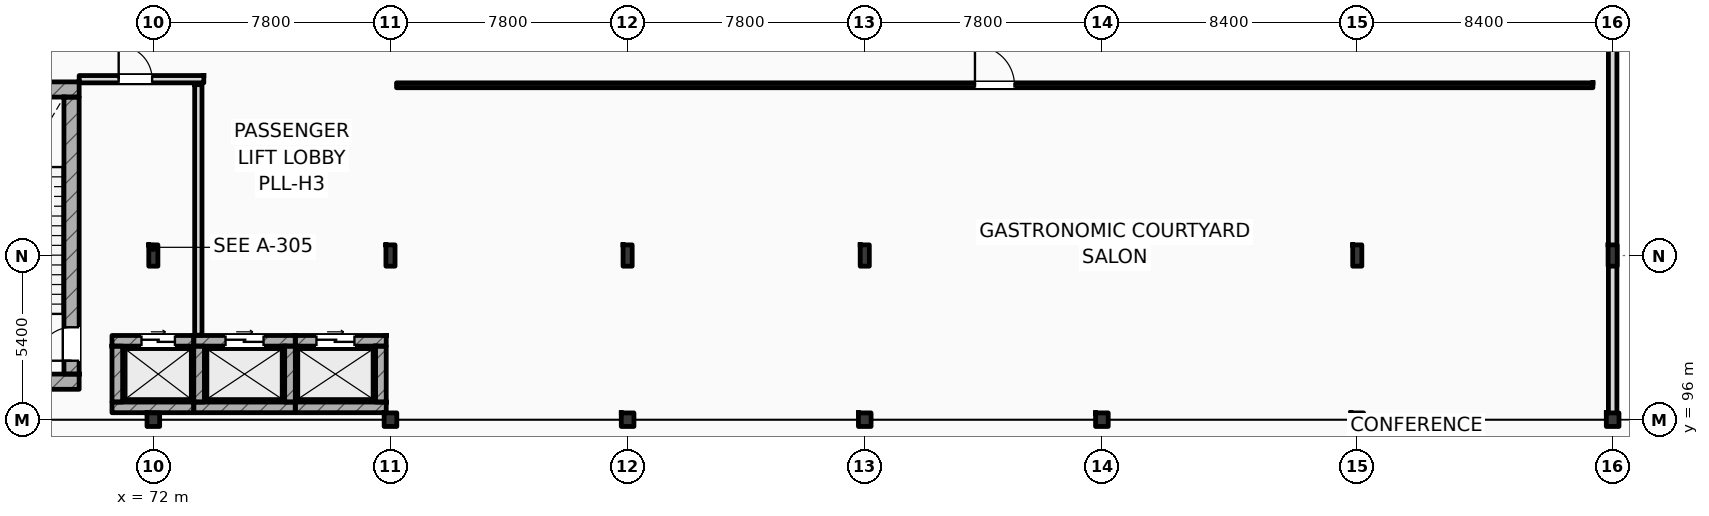
"""IFC4 building model, lengths in metres.
Left out: names, types, materials, properties, quantities, classifications, styles, units other than length and angle.
Written with IfcOpenShell. Run it as: python <this file> out.ifc"""

import sys

from ifc_helpers import new_model, si_unit, direction, frame, frame_2d, origin, origin_2d, place, context, subcontext, project, spatial, rectangle, i_section, extrude, element, fill, save


model = new_model("IFC4")
c1 = context("Model", 3, precision=1e-05, world=origin(), true_north=direction((0.0, 1.0)))
c2 = subcontext(c1, "Body", "Model", "MODEL_VIEW")
j1 = project(units=[si_unit("LENGTHUNIT", "METRE"), si_unit("PLANEANGLEUNIT", "RADIAN")], contexts=[c1])
p1 = place(None, origin())
s1 = spatial("IfcSite", under=j1, at=p1, CompositionType="ELEMENT")
p2 = place(p1, origin())
s2 = spatial("IfcBuilding", under=s1, at=p2, CompositionType="ELEMENT")
p3 = place(p2, frame((0.0, 0.0, 6.0)))
s3 = spatial("IfcBuildingStorey", under=s2, at=p3, CompositionType="ELEMENT", Elevation=6.0)
p4 = place(p3, frame((72.0, 96.0, 0.0), z_axis=(0.0, 0.0, 1.0), x_axis=(1.0, 0.0, 0.0)))
e1 = element("IfcColumn", 1, at=p4, inside=s3, PredefinedType="COLUMN", context=c2, shape_type="SweptSolid", body=[
    extrude(i_section(OverallWidth=0.416, OverallDepth=0.446, WebThickness=0.036, FlangeThickness=0.048, FilletRadius=0.015, at=origin_2d()), origin(), (0.0, 0.0, 1.0), 5.4),
])
p5 = place(p3, frame((72.0, 101.4, 0.0), z_axis=(0.0, 0.0, 1.0), x_axis=(1.0, 0.0, 0.0)))
e2 = element("IfcColumn", 2, at=p5, inside=s3, PredefinedType="COLUMN", context=c2, shape_type="SweptSolid", body=[
    extrude(i_section(OverallWidth=0.3, OverallDepth=0.7, WebThickness=0.017, FlangeThickness=0.032, FilletRadius=0.027, at=origin_2d()), origin(), (0.0, 0.0, 1.0), 5.4),
])
p6 = place(p3, frame((79.8, 96.0, 0.0), z_axis=(0.0, 0.0, 1.0), x_axis=(1.0, 0.0, 0.0)))
e3 = element("IfcColumn", 3, at=p6, inside=s3, PredefinedType="COLUMN", context=c2, shape_type="SweptSolid", body=[
    extrude(i_section(OverallWidth=0.416, OverallDepth=0.446, WebThickness=0.036, FlangeThickness=0.048, FilletRadius=0.015, at=origin_2d()), origin(), (0.0, 0.0, 1.0), 5.4),
])
p7 = place(p3, frame((79.8, 101.4, 0.0), z_axis=(0.0, 0.0, 1.0), x_axis=(1.0, 0.0, 0.0)))
e4 = element("IfcColumn", 4, at=p7, inside=s3, PredefinedType="COLUMN", context=c2, shape_type="SweptSolid", body=[
    extrude(i_section(OverallWidth=0.3, OverallDepth=0.7, WebThickness=0.017, FlangeThickness=0.032, FilletRadius=0.027, at=origin_2d()), origin(), (0.0, 0.0, 1.0), 5.4),
])
p8 = place(p3, frame((87.6, 96.0, 0.0), z_axis=(0.0, 0.0, 1.0), x_axis=(1.0, 0.0, 0.0)))
e5 = element("IfcColumn", 5, at=p8, inside=s3, PredefinedType="COLUMN", context=c2, shape_type="SweptSolid", body=[
    extrude(i_section(OverallWidth=0.416, OverallDepth=0.446, WebThickness=0.036, FlangeThickness=0.048, FilletRadius=0.015, at=origin_2d()), origin(), (0.0, 0.0, 1.0), 5.4),
])
p9 = place(p3, frame((87.6, 101.4, 0.0), z_axis=(0.0, 0.0, 1.0), x_axis=(1.0, 0.0, 0.0)))
e6 = element("IfcColumn", 6, at=p9, inside=s3, PredefinedType="COLUMN", context=c2, shape_type="SweptSolid", body=[
    extrude(i_section(OverallWidth=0.3, OverallDepth=0.7, WebThickness=0.017, FlangeThickness=0.032, FilletRadius=0.027, at=origin_2d()), origin(), (0.0, 0.0, 1.0), 5.4),
])
p10 = place(p3, frame((95.4, 96.0, 0.0), z_axis=(0.0, 0.0, 1.0), x_axis=(1.0, 0.0, 0.0)))
e7 = element("IfcColumn", 7, at=p10, inside=s3, PredefinedType="COLUMN", context=c2, shape_type="SweptSolid", body=[
    extrude(i_section(OverallWidth=0.416, OverallDepth=0.446, WebThickness=0.036, FlangeThickness=0.048, FilletRadius=0.015, at=origin_2d()), origin(), (0.0, 0.0, 1.0), 5.4),
])
p11 = place(p3, frame((95.4, 101.4, 0.0), z_axis=(0.0, 0.0, 1.0), x_axis=(1.0, 0.0, 0.0)))
e8 = element("IfcColumn", 8, at=p11, inside=s3, PredefinedType="COLUMN", context=c2, shape_type="SweptSolid", body=[
    extrude(i_section(OverallWidth=0.3, OverallDepth=0.7, WebThickness=0.017, FlangeThickness=0.032, FilletRadius=0.027, at=origin_2d()), origin(), (0.0, 0.0, 1.0), 5.4),
])
p12 = place(p3, frame((103.2, 96.0, 0.0), z_axis=(0.0, 0.0, 1.0), x_axis=(1.0, 0.0, 0.0)))
e9 = element("IfcColumn", 9, at=p12, inside=s3, PredefinedType="COLUMN", context=c2, shape_type="SweptSolid", body=[
    extrude(i_section(OverallWidth=0.416, OverallDepth=0.446, WebThickness=0.036, FlangeThickness=0.048, FilletRadius=0.015, at=origin_2d()), origin(), (0.0, 0.0, 1.0), 5.4),
])
p13 = place(p3, frame((103.2, 101.4, 0.0), z_axis=(0.0, 0.0, 1.0), x_axis=(1.0, 0.0, 0.0)))
e10 = element("IfcColumn", 10, at=p13, inside=s3, PredefinedType="COLUMN", context=c2, shape_type="SweptSolid", body=[
    extrude(i_section(OverallWidth=0.3, OverallDepth=0.7, WebThickness=0.017, FlangeThickness=0.032, FilletRadius=0.027, at=origin_2d()), origin(), (0.0, 0.0, 1.0), 5.4),
])
p14 = place(p3, frame((111.6, 96.0, 0.0), z_axis=(0.0, 0.0, 1.0), x_axis=(1.0, 0.0, 0.0)))
e11 = element("IfcColumn", 11, at=p14, inside=s3, PredefinedType="COLUMN", context=c2, shape_type="SweptSolid", body=[
    extrude(i_section(OverallWidth=0.416, OverallDepth=0.446, WebThickness=0.036, FlangeThickness=0.048, FilletRadius=0.015, at=origin_2d()), origin(), (0.0, 0.0, 1.0), 5.4),
])
p15 = place(p3, frame((111.6, 101.4, 0.0), z_axis=(0.0, 0.0, 1.0), x_axis=(1.0, 0.0, 0.0)))
e12 = element("IfcColumn", 12, at=p15, inside=s3, PredefinedType="COLUMN", context=c2, shape_type="SweptSolid", body=[
    extrude(i_section(OverallWidth=0.3, OverallDepth=0.7, WebThickness=0.017, FlangeThickness=0.032, FilletRadius=0.027, at=origin_2d()), origin(), (0.0, 0.0, 1.0), 5.4),
])
p16 = place(p3, frame((120.0, 96.0, 0.0), z_axis=(0.0, 0.0, 1.0), x_axis=(1.0, 0.0, 0.0)))
e13 = element("IfcColumn", 13, at=p16, inside=s3, PredefinedType="COLUMN", context=c2, shape_type="SweptSolid", body=[
    extrude(i_section(OverallWidth=0.416, OverallDepth=0.446, WebThickness=0.036, FlangeThickness=0.048, FilletRadius=0.015, at=origin_2d()), origin(), (0.0, 0.0, 1.0), 5.4),
])
p17 = place(p3, frame((120.0, 101.4, 0.0), z_axis=(0.0, 0.0, 1.0), x_axis=(1.0, 0.0, 0.0)))
e14 = element("IfcColumn", 14, at=p17, inside=s3, PredefinedType="COLUMN", context=c2, shape_type="SweptSolid", body=[
    extrude(i_section(OverallWidth=0.3, OverallDepth=0.7, WebThickness=0.017, FlangeThickness=0.032, FilletRadius=0.027, at=origin_2d()), origin(), (0.0, 0.0, 1.0), 5.4),
])
for number, where, z_axis, x_axis in (
    (15, (64.4, 106.862, 0.0), (0.0, 0.0, 1.0), (1.0, 0.0, 0.0)),
    (16, (64.4, 97.25, 0.0), (0.0, 0.0, 1.0), (1.0, 0.0, 0.0)),
):
    element("IfcWall", number, at=place(p3, frame(where, z_axis=z_axis, x_axis=x_axis)), inside=s3, PredefinedType="SHEAR", context=c2, shape_type="SweptSolid", body=[
        extrude(rectangle(XDim=5.16, YDim=0.5, at=frame_2d((2.58, 0.0))), origin(), (0.0, 0.0, 1.0), 5.4),
    ])
p18 = place(p3, frame((69.31, 97.5, 0.0), z_axis=(0.0, 0.0, 1.0), x_axis=(0.0, 1.0, 0.0)))
e17 = element("IfcWall", 17, at=p18, inside=s3, PredefinedType="SHEAR", context=c2, shape_type="SweptSolid", body=[
    extrude(rectangle(XDim=9.112, YDim=0.5, at=frame_2d((4.556, 0.0))), origin(), (0.0, 0.0, 1.0), 5.4),
])
p19 = place(p18, frame((0.44, 0.0, 0.0)))
e18 = element("IfcOpeningElement", 18, at=p19, cuts=e17, PredefinedType="OPENING", context=c2, shape_type="SweptSolid", body=[
    extrude(rectangle(XDim=1.1, YDim=2.2, at=frame_2d((0.55, 1.1))), frame((0.0, 0.26, 0.0), z_axis=(0.0, -1.0, 0.0), x_axis=(1.0, 0.0, 0.0)), (0.0, 0.0, 1.0), 0.52),
])
p20 = place(p3, frame((120.0, 96.0, 0.0), z_axis=(0.0, 0.0, 1.0), x_axis=(0.0, 1.0, 0.0)))
e19 = element("IfcWall", 19, at=p20, inside=s3, PredefinedType="STANDARD", context=c2, shape_type="SweptSolid", body=[
    extrude(rectangle(XDim=22.0, YDim=0.28, at=frame_2d((11.0, 0.0))), origin(), (0.0, 0.0, 1.0), 4.59),
])
p21 = place(p3, frame((70.64, 98.595, 0.0), z_axis=(0.0, 0.0, 1.0), x_axis=(1.0, 0.0, 0.0)))
e20 = element("IfcWall", 20, at=p21, inside=s3, PredefinedType="SHEAR", context=c2, shape_type="SweptSolid", body=[
    extrude(rectangle(XDim=2.69, YDim=0.35, at=frame_2d((1.345, 0.0))), origin(), (0.0, 0.0, 1.0), 5.05),
])
p22 = place(p21, frame((0.97, 0.0, 0.0)))
e21 = element("IfcOpeningElement", 21, at=p22, cuts=e20, PredefinedType="OPENING", context=c2, shape_type="SweptSolid", body=[
    extrude(rectangle(XDim=1.1, YDim=2.2, at=frame_2d((0.55, 1.1))), frame((0.0, 0.185, 0.0), z_axis=(0.0, -1.0, 0.0), x_axis=(1.0, 0.0, 0.0)), (0.0, 0.0, 1.0), 0.37),
])
p23 = place(p3, frame((70.64, 96.405, 0.0), z_axis=(0.0, 0.0, 1.0), x_axis=(1.0, 0.0, 0.0)))
e22 = element("IfcWall", 22, at=p23, inside=s3, PredefinedType="SHEAR", context=c2, shape_type="SweptSolid", body=[
    extrude(rectangle(XDim=2.69, YDim=0.35, at=frame_2d((1.345, 0.0))), origin(), (0.0, 0.0, 1.0), 5.05),
])
p24 = place(p3, frame((70.815, 96.58, 0.0), z_axis=(0.0, 0.0, 1.0), x_axis=(0.0, 1.0, 0.0)))
e23 = element("IfcWall", 23, at=p24, inside=s3, PredefinedType="SHEAR", context=c2, shape_type="SweptSolid", body=[
    extrude(rectangle(XDim=1.84, YDim=0.35, at=frame_2d((0.92, 0.0))), origin(), (0.0, 0.0, 1.0), 5.05),
])
p25 = place(p3, frame((73.33, 98.595, 0.0), z_axis=(0.0, 0.0, 1.0), x_axis=(1.0, 0.0, 0.0)))
e24 = element("IfcWall", 24, at=p25, inside=s3, PredefinedType="SHEAR", context=c2, shape_type="SweptSolid", body=[
    extrude(rectangle(XDim=3.34, YDim=0.35, at=frame_2d((1.67, 0.0))), origin(), (0.0, 0.0, 1.0), 5.05),
])
p26 = place(p25, frame((1.045, 0.0, 0.0)))
e25 = element("IfcOpeningElement", 25, at=p26, cuts=e24, PredefinedType="OPENING", context=c2, shape_type="SweptSolid", body=[
    extrude(rectangle(XDim=1.25, YDim=2.25, at=frame_2d((0.625, 1.125))), frame((0.0, 0.185, 0.0), z_axis=(0.0, -1.0, 0.0), x_axis=(1.0, 0.0, 0.0)), (0.0, 0.0, 1.0), 0.37),
])
p27 = place(p3, frame((73.33, 96.405, 0.0), z_axis=(0.0, 0.0, 1.0), x_axis=(1.0, 0.0, 0.0)))
e26 = element("IfcWall", 26, at=p27, inside=s3, PredefinedType="SHEAR", context=c2, shape_type="SweptSolid", body=[
    extrude(rectangle(XDim=3.34, YDim=0.35, at=frame_2d((1.67, 0.0))), origin(), (0.0, 0.0, 1.0), 5.05),
])
for number, where, z_axis, x_axis in (
    (27, (73.505, 96.58, 0.0), (0.0, 0.0, 1.0), (0.0, 1.0, 0.0)),
    (28, (76.495, 96.58, 0.0), (0.0, 0.0, 1.0), (0.0, 1.0, 0.0)),
):
    element("IfcWall", number, at=place(p3, frame(where, z_axis=z_axis, x_axis=x_axis)), inside=s3, PredefinedType="SHEAR", context=c2, shape_type="SweptSolid", body=[
        extrude(rectangle(XDim=1.84, YDim=0.35, at=frame_2d((0.92, 0.0))), origin(), (0.0, 0.0, 1.0), 5.05),
    ])
p28 = place(p3, frame((76.67, 98.595, 0.0), z_axis=(0.0, 0.0, 1.0), x_axis=(1.0, 0.0, 0.0)))
e29 = element("IfcWall", 29, at=p28, inside=s3, PredefinedType="SHEAR", context=c2, shape_type="SweptSolid", body=[
    extrude(rectangle(XDim=2.99, YDim=0.35, at=frame_2d((1.495, 0.0))), origin(), (0.0, 0.0, 1.0), 5.05),
])
p29 = place(p28, frame((0.695, 0.0, 0.0)))
e30 = element("IfcOpeningElement", 30, at=p29, cuts=e29, PredefinedType="OPENING", context=c2, shape_type="SweptSolid", body=[
    extrude(rectangle(XDim=1.25, YDim=2.25, at=frame_2d((0.625, 1.125))), frame((0.0, 0.185, 0.0), z_axis=(0.0, -1.0, 0.0), x_axis=(1.0, 0.0, 0.0)), (0.0, 0.0, 1.0), 0.37),
])
p30 = place(p3, frame((76.67, 96.405, 0.0), z_axis=(0.0, 0.0, 1.0), x_axis=(1.0, 0.0, 0.0)))
e31 = element("IfcWall", 31, at=p30, inside=s3, PredefinedType="SHEAR", context=c2, shape_type="SweptSolid", body=[
    extrude(rectangle(XDim=2.99, YDim=0.35, at=frame_2d((1.495, 0.0))), origin(), (0.0, 0.0, 1.0), 5.05),
])
p31 = place(p3, frame((79.485, 96.58, 0.0), z_axis=(0.0, 0.0, 1.0), x_axis=(0.0, 1.0, 0.0)))
e32 = element("IfcWall", 32, at=p31, inside=s3, PredefinedType="SHEAR", context=c2, shape_type="SweptSolid", body=[
    extrude(rectangle(XDim=1.84, YDim=0.35, at=frame_2d((0.92, 0.0))), origin(), (0.0, 0.0, 1.0), 4.59),
])
p32 = place(p3, frame((73.48, 98.78, 0.0), z_axis=(0.0, 0.0, 1.0), x_axis=(0.0, 1.0, 0.0)))
e33 = element("IfcWall", 33, at=p32, inside=s3, PredefinedType="STANDARD", context=c2, shape_type="SweptSolid", body=[
    extrude(rectangle(XDim=8.24, YDim=0.24, at=frame_2d((4.12, 0.0))), origin(), (0.0, 0.0, 1.0), 5.05),
])
p33 = place(p3, frame((69.56, 107.2, 0.0), z_axis=(0.0, 0.0, 1.0), x_axis=(1.0, 0.0, 0.0)))
e34 = element("IfcWall", 34, at=p33, inside=s3, PredefinedType="STANDARD", context=c2, shape_type="SweptSolid", body=[
    extrude(rectangle(XDim=4.1, YDim=0.24, at=frame_2d((2.05, 0.0))), origin(), (0.0, 0.0, 1.0), 5.05),
])
p34 = place(p33, frame((1.3, 0.0, 0.0)))
e35 = element("IfcOpeningElement", 35, at=p34, cuts=e34, PredefinedType="OPENING", context=c2, shape_type="SweptSolid", body=[
    extrude(rectangle(XDim=1.1, YDim=2.2, at=frame_2d((0.55, 1.1))), frame((0.0, 0.13, 0.0), z_axis=(0.0, -1.0, 0.0), x_axis=(1.0, 0.0, 0.0)), (0.0, 0.0, 1.0), 0.26),
])
p35 = place(p3, frame((80.0, 107.0, 0.0), z_axis=(0.0, 0.0, 1.0), x_axis=(1.0, 0.0, 0.0)))
e36 = element("IfcWall", 36, at=p35, inside=s3, PredefinedType="PARTITIONING", context=c2, shape_type="SweptSolid", body=[
    extrude(rectangle(XDim=39.35, YDim=0.16, at=frame_2d((19.675, 0.0))), origin(), (0.0, 0.0, 1.0), 5.05),
])
p36 = place(p35, frame((19.025, 0.0, 0.0)))
e37 = element("IfcOpeningElement", 37, at=p36, cuts=e36, PredefinedType="OPENING", context=c2, shape_type="SweptSolid", body=[
    extrude(rectangle(XDim=1.3, YDim=2.2, at=frame_2d((0.65, 1.1))), frame((0.0, 0.09, 0.0), z_axis=(0.0, -1.0, 0.0), x_axis=(1.0, 0.0, 0.0)), (0.0, 0.0, 1.0), 0.18),
])
p37 = place(p19, origin())
e38 = element("IfcDoor", 38, at=p37, inside=s3, OperationType="SINGLE_SWING_LEFT", PredefinedType="DOOR", context=c2, shape_type="SweptSolid", body=[
    extrude(rectangle(XDim=1.1, YDim=2.2, at=frame_2d((0.55, 1.1))), frame((0.0, 0.025, 0.0), z_axis=(0.0, -1.0, 0.0), x_axis=(1.0, 0.0, 0.0)), (0.0, 0.0, 1.0), 0.05),
])
fill(e18, e38)
p38 = place(p22, origin())
e39 = element("IfcDoor", 39, at=p38, inside=s3, OperationType="SLIDING_TO_LEFT", PredefinedType="DOOR", context=c2, shape_type="SweptSolid", body=[
    extrude(rectangle(XDim=1.1, YDim=2.2, at=frame_2d((0.55, 1.1))), frame((0.0, 0.025, 0.0), z_axis=(0.0, -1.0, 0.0), x_axis=(1.0, 0.0, 0.0)), (0.0, 0.0, 1.0), 0.05),
])
fill(e21, e39)
p39 = place(p26, origin())
e40 = element("IfcDoor", 40, at=p39, inside=s3, OperationType="SLIDING_TO_LEFT", PredefinedType="DOOR", context=c2, shape_type="SweptSolid", body=[
    extrude(rectangle(XDim=1.25, YDim=2.25, at=frame_2d((0.625, 1.125))), frame((0.0, 0.025, 0.0), z_axis=(0.0, -1.0, 0.0), x_axis=(1.0, 0.0, 0.0)), (0.0, 0.0, 1.0), 0.05),
])
fill(e25, e40)
p40 = place(p29, origin())
e41 = element("IfcDoor", 41, at=p40, inside=s3, OperationType="SLIDING_TO_LEFT", PredefinedType="DOOR", context=c2, shape_type="SweptSolid", body=[
    extrude(rectangle(XDim=1.25, YDim=2.25, at=frame_2d((0.625, 1.125))), frame((0.0, 0.025, 0.0), z_axis=(0.0, -1.0, 0.0), x_axis=(1.0, 0.0, 0.0)), (0.0, 0.0, 1.0), 0.05),
])
fill(e30, e41)
p41 = place(p34, origin())
e42 = element("IfcDoor", 42, at=p41, inside=s3, OperationType="SINGLE_SWING_LEFT", PredefinedType="DOOR", context=c2, shape_type="SweptSolid", body=[
    extrude(rectangle(XDim=1.1, YDim=2.2, at=frame_2d((0.55, 1.1))), frame((0.0, 0.025, 0.0), z_axis=(0.0, -1.0, 0.0), x_axis=(1.0, 0.0, 0.0)), (0.0, 0.0, 1.0), 0.05),
])
fill(e35, e42)
p42 = place(p36, origin())
e43 = element("IfcDoor", 43, at=p42, inside=s3, OperationType="SINGLE_SWING_LEFT", PredefinedType="DOOR", context=c2, shape_type="SweptSolid", body=[
    extrude(rectangle(XDim=1.3, YDim=2.2, at=frame_2d((0.65, 1.1))), frame((0.0, 0.025, 0.0), z_axis=(0.0, -1.0, 0.0), x_axis=(1.0, 0.0, 0.0)), (0.0, 0.0, 1.0), 0.05),
])
fill(e37, e43)
save(model, sys.argv[1])
